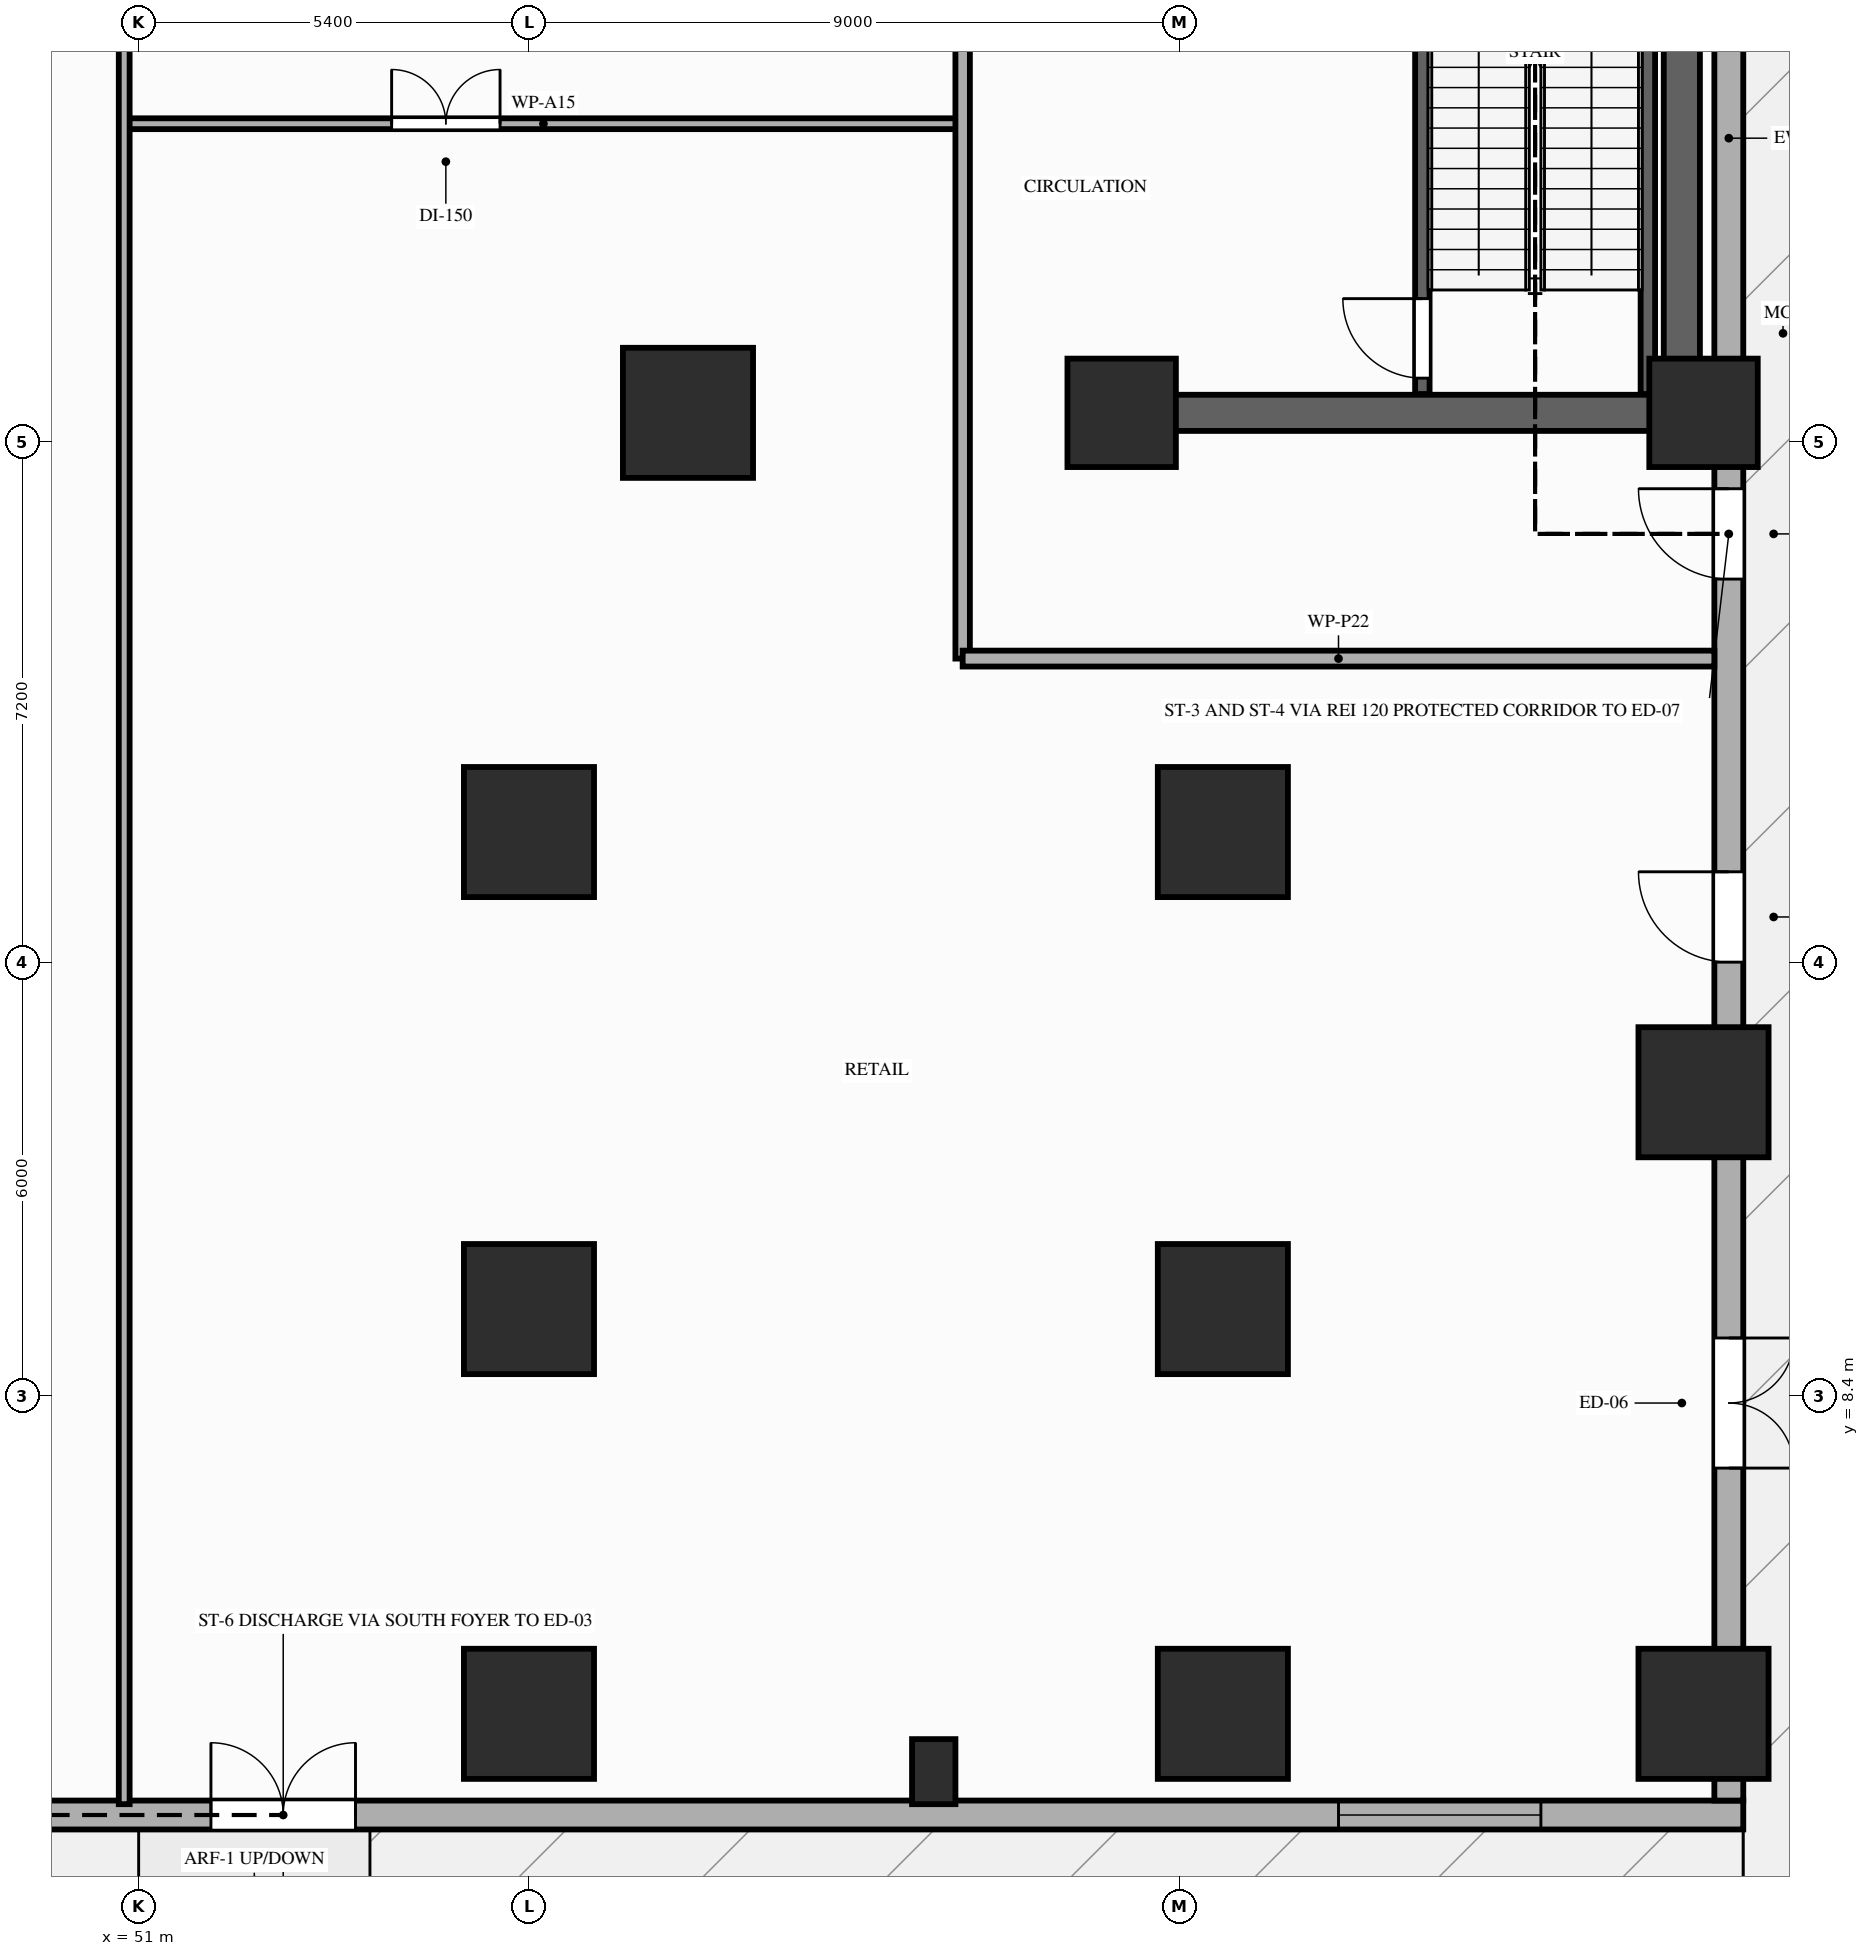
"""IFC4 building model, lengths in metres.
Left out: names, types, materials, properties, quantities, classifications, styles, units other than length and angle.
Written with IfcOpenShell. Run it as: python <this file> out.ifc"""

import sys

from ifc_helpers import new_model, si_unit, direction, frame, frame_2d, origin, origin_2d, place, context, subcontext, project, spatial, rectangle, extrude, element, fill, save


model = new_model("IFC4")
c1 = context("Model", 3, precision=1e-05, world=origin(), true_north=direction((0.0, 1.0)))
c2 = subcontext(c1, "Body", "Model", "MODEL_VIEW")
j1 = project(units=[si_unit("LENGTHUNIT", "METRE"), si_unit("PLANEANGLEUNIT", "RADIAN")], contexts=[c1])
p1 = place(None, origin())
s1 = spatial("IfcSite", under=j1, at=p1, CompositionType="ELEMENT")
p2 = place(p1, origin())
s2 = spatial("IfcBuilding", under=s1, at=p2, CompositionType="ELEMENT")
p3 = place(p2, origin())
s3 = spatial("IfcBuildingStorey", under=s2, at=p3, CompositionType="ELEMENT", Elevation=0.0)
for number, where, z_axis, x_axis in (
    (1, (64.6, 22.0, 0.0), (0.0, 0.0, 1.0), (1.0, 0.0, 0.0)),
    (2, (72.65, 22.0, 0.0), (0.0, 0.0, 1.0), (1.0, 0.0, 0.0)),
):
    element("IfcColumn", number, at=place(p3, frame(where, z_axis=z_axis, x_axis=x_axis)), inside=s3, PredefinedType="COLUMN", context=c2, shape_type="SweptSolid", body=[
        extrude(rectangle(XDim=1.5, YDim=1.5, at=origin_2d()), origin(), (0.0, 0.0, 1.0), 4.6),
    ])
for number, where, z_axis, x_axis in (
    (3, (58.6, 22.0, 0.0), (0.0, 0.0, 1.0), (1.0, 0.0, 0.0)),
    (4, (56.4, 9.6, 0.0), (0.0, 0.0, 1.0), (1.0, 0.0, 0.0)),
    (5, (66.0, 9.6, 0.0), (0.0, 0.0, 1.0), (1.0, 0.0, 0.0)),
    (6, (56.4, 16.2, 0.0), (0.0, 0.0, 1.0), (1.0, 0.0, 0.0)),
    (7, (66.0, 16.2, 0.0), (0.0, 0.0, 1.0), (1.0, 0.0, 0.0)),
    (8, (56.4, 4.0, 0.0), (0.0, 0.0, 1.0), (1.0, 0.0, 0.0)),
    (9, (66.0, 4.0, 0.0), (0.0, 0.0, 1.0), (1.0, 0.0, 0.0)),
    (10, (72.65, 4.0, 0.0), (0.0, 0.0, 1.0), (1.0, 0.0, 0.0)),
    (11, (72.65, 12.6, 0.0), (0.0, 0.0, 1.0), (1.0, 0.0, 0.0)),
):
    element("IfcColumn", number, at=place(p3, frame(where, z_axis=z_axis, x_axis=x_axis)), inside=s3, PredefinedType="COLUMN", context=c2, shape_type="SweptSolid", body=[
        extrude(rectangle(XDim=1.8, YDim=1.8, at=origin_2d()), origin(), (0.0, 0.0, 1.0), 4.6),
    ])
p4 = place(p3, frame((62.0, 3.2, 0.0), z_axis=(0.0, 0.0, 1.0), x_axis=(1.0, 0.0, 0.0)))
e12 = element("IfcColumn", 12, at=p4, inside=s3, PredefinedType="PILASTER", context=c2, shape_type="SweptSolid", body=[
    extrude(rectangle(XDim=0.6, YDim=0.9, at=origin_2d()), origin(), (0.0, 0.0, 1.0), 4.6),
])
p5 = place(p3, frame((3.6, 2.6, 0.0), z_axis=(0.0, 0.0, 1.0), x_axis=(1.0, 0.0, 0.0)))
e13 = element("IfcWall", 13, at=p5, inside=s3, PredefinedType="STANDARD", context=c2, shape_type="SweptSolid", body=[
    extrude(rectangle(XDim=69.6, YDim=0.4, at=frame_2d((34.8, 0.0))), origin(), (0.0, 0.0, 1.0), 4.35),
])
p6 = place(p5, frame((24.6, 0.0, 0.9)))
e14 = element("IfcOpeningElement", 14, at=p6, cuts=e13, PredefinedType="OPENING", context=c2, shape_type="SweptSolid", body=[
    extrude(rectangle(XDim=2.8, YDim=2.2, at=frame_2d((1.4, 1.1))), frame((0.0, 0.21, 0.0), z_axis=(0.0, -1.0, 0.0), x_axis=(1.0, 0.0, 0.0)), (0.0, 0.0, 1.0), 0.42),
])
p7 = place(p5, frame((36.2, 0.0, 0.9)))
e15 = element("IfcOpeningElement", 15, at=p7, cuts=e13, PredefinedType="OPENING", context=c2, shape_type="SweptSolid", body=[
    extrude(rectangle(XDim=2.8, YDim=2.2, at=frame_2d((1.4, 1.1))), frame((0.0, 0.21, 0.0), z_axis=(0.0, -1.0, 0.0), x_axis=(1.0, 0.0, 0.0)), (0.0, 0.0, 1.0), 0.42),
])
p8 = place(p5, frame((64.0, 0.0, 0.9)))
e16 = element("IfcOpeningElement", 16, at=p8, cuts=e13, PredefinedType="OPENING", context=c2, shape_type="SweptSolid", body=[
    extrude(rectangle(XDim=2.8, YDim=2.2, at=frame_2d((1.4, 1.1))), frame((0.0, 0.21, 0.0), z_axis=(0.0, -1.0, 0.0), x_axis=(1.0, 0.0, 0.0)), (0.0, 0.0, 1.0), 0.42),
])
p9 = place(p5, frame((17.2, 0.0, 0.0)))
e17 = element("IfcOpeningElement", 17, at=p9, cuts=e13, PredefinedType="OPENING", context=c2, shape_type="SweptSolid", body=[
    extrude(rectangle(XDim=2.2, YDim=2.45, at=frame_2d((1.1, 1.225))), frame((0.0, 0.21, 0.0), z_axis=(0.0, -1.0, 0.0), x_axis=(1.0, 0.0, 0.0)), (0.0, 0.0, 1.0), 0.42),
])
p10 = place(p5, frame((48.4, 0.0, 0.0)))
e18 = element("IfcOpeningElement", 18, at=p10, cuts=e13, PredefinedType="OPENING", context=c2, shape_type="SweptSolid", body=[
    extrude(rectangle(XDim=2.0, YDim=2.4, at=frame_2d((1.0, 1.2))), frame((0.0, 0.21, 0.0), z_axis=(0.0, -1.0, 0.0), x_axis=(1.0, 0.0, 0.0)), (0.0, 0.0, 1.0), 0.42),
])
p11 = place(p3, frame((73.0, 2.8, 0.0), z_axis=(0.0, 0.0, 1.0), x_axis=(0.0, 1.0, 0.0)))
e19 = element("IfcWall", 19, at=p11, inside=s3, PredefinedType="STANDARD", context=c2, shape_type="SweptSolid", body=[
    extrude(rectangle(XDim=46.0, YDim=0.4, at=frame_2d((23.0, 0.0))), origin(), (0.0, 0.0, 1.0), 3.63),
])
p12 = place(p11, frame((11.6, 0.0, 0.0)))
e20 = element("IfcOpeningElement", 20, at=p12, cuts=e19, PredefinedType="OPENING", context=c2, shape_type="SweptSolid", body=[
    extrude(rectangle(XDim=1.25, YDim=2.2, at=frame_2d((0.625, 1.1))), frame((0.0, 0.21, 0.0), z_axis=(0.0, -1.0, 0.0), x_axis=(1.0, 0.0, 0.0)), (0.0, 0.0, 1.0), 0.42),
])
p13 = place(p11, frame((4.6, 0.0, 0.0)))
e21 = element("IfcOpeningElement", 21, at=p13, cuts=e19, PredefinedType="OPENING", context=c2, shape_type="SweptSolid", body=[
    extrude(rectangle(XDim=1.8, YDim=2.25, at=frame_2d((0.9, 1.125))), frame((0.0, 0.21, 0.0), z_axis=(0.0, -1.0, 0.0), x_axis=(1.0, 0.0, 0.0)), (0.0, 0.0, 1.0), 0.42),
])
p14 = place(p11, frame((16.9, 0.0, 0.0)))
e22 = element("IfcOpeningElement", 22, at=p14, cuts=e19, PredefinedType="OPENING", context=c2, shape_type="SweptSolid", body=[
    extrude(rectangle(XDim=1.25, YDim=2.2, at=frame_2d((0.625, 1.1))), frame((0.0, 0.21, 0.0), z_axis=(0.0, -1.0, 0.0), x_axis=(1.0, 0.0, 0.0)), (0.0, 0.0, 1.0), 0.42),
])
p15 = place(p11, frame((40.95, 0.0, 0.0)))
e23 = element("IfcOpeningElement", 23, at=p15, cuts=e19, PredefinedType="OPENING", context=c2, shape_type="SweptSolid", body=[
    extrude(rectangle(XDim=2.55, YDim=2.55, at=frame_2d((1.275, 1.275))), frame((0.0, 0.21, 0.0), z_axis=(0.0, -1.0, 0.0), x_axis=(1.0, 0.0, 0.0)), (0.0, 0.0, 1.0), 0.42),
])
p16 = place(p3, frame((72.35, 22.0, 0.0), z_axis=(0.0, 0.0, 1.0), x_axis=(0.0, 1.0, 0.0)))
e24 = element("IfcWall", 24, at=p16, inside=s3, PredefinedType="SHEAR", context=c2, shape_type="SweptSolid", body=[
    extrude(rectangle(XDim=20.25, YDim=0.5, at=frame_2d((10.125, 0.0))), origin(), (0.0, 0.0, 1.0), 4.35),
])
p17 = place(p3, frame((64.6, 22.0, 0.0), z_axis=(0.0, 0.0, 1.0), x_axis=(1.0, 0.0, 0.0)))
e25 = element("IfcWall", 25, at=p17, inside=s3, PredefinedType="SHEAR", context=c2, shape_type="SweptSolid", body=[
    extrude(rectangle(XDim=7.5, YDim=0.5, at=frame_2d((3.75, 0.0))), origin(), (0.0, 0.0, 1.0), 4.35),
])
p18 = place(p3, frame((68.76, 22.26, 0.0), z_axis=(0.0, 0.0, 1.0), x_axis=(0.0, 1.0, 0.0)))
e26 = element("IfcWall", 26, at=p18, inside=s3, PredefinedType="SHEAR", context=c2, shape_type="SweptSolid", body=[
    extrude(rectangle(XDim=7.82, YDim=0.2, at=frame_2d((3.91, 0.0))), origin(), (0.0, 0.0, 1.0), 4.35),
])
p19 = place(p18, frame((0.22, 0.0, 0.0)))
e27 = element("IfcOpeningElement", 27, at=p19, cuts=e26, PredefinedType="OPENING", context=c2, shape_type="SweptSolid", body=[
    extrude(rectangle(XDim=1.1, YDim=2.15, at=frame_2d((0.55, 1.075))), frame((0.0, 0.11, 0.0), z_axis=(0.0, -1.0, 0.0), x_axis=(1.0, 0.0, 0.0)), (0.0, 0.0, 1.0), 0.22),
])
p20 = place(p3, frame((71.88, 22.26, 0.0), z_axis=(0.0, 0.0, 1.0), x_axis=(0.0, 1.0, 0.0)))
e28 = element("IfcWall", 28, at=p20, inside=s3, PredefinedType="SHEAR", context=c2, shape_type="SweptSolid", body=[
    extrude(rectangle(XDim=7.82, YDim=0.2, at=frame_2d((3.91, 0.0))), origin(), (0.0, 0.0, 1.0), 4.35),
])
p21 = place(p3, frame((50.8, 26.0, 0.0), z_axis=(0.0, 0.0, 1.0), x_axis=(1.0, 0.0, 0.0)))
e29 = element("IfcWall", 29, at=p21, inside=s3, PredefinedType="PARTITIONING", context=c2, shape_type="SweptSolid", body=[
    extrude(rectangle(XDim=11.6, YDim=0.15, at=frame_2d((5.8, 0.0))), origin(), (0.0, 0.0, 1.0), 3.63),
])
p22 = place(p21, frame((3.7, 0.0, 0.0)))
e30 = element("IfcOpeningElement", 30, at=p22, cuts=e29, PredefinedType="OPENING", context=c2, shape_type="SweptSolid", body=[
    extrude(rectangle(XDim=1.5, YDim=2.18, at=frame_2d((0.75, 1.09))), frame((0.0, 0.085, 0.0), z_axis=(0.0, -1.0, 0.0), x_axis=(1.0, 0.0, 0.0)), (0.0, 0.0, 1.0), 0.17),
])
p23 = place(p3, frame((50.8, 2.75, 0.0), z_axis=(0.0, 0.0, 1.0), x_axis=(0.0, 1.0, 0.0)))
e31 = element("IfcWall", 31, at=p23, inside=s3, PredefinedType="PARTITIONING", context=c2, shape_type="SweptSolid", body=[
    extrude(rectangle(XDim=24.85, YDim=0.15, at=frame_2d((12.425, 0.0))), origin(), (0.0, 0.0, 1.0), 3.43),
])
p24 = place(p3, frame((62.4, 18.6, 0.0), z_axis=(0.0, 0.0, 1.0), x_axis=(0.0, 1.0, 0.0)))
e32 = element("IfcWall", 32, at=p24, inside=s3, PredefinedType="PARTITIONING", context=c2, shape_type="SweptSolid", body=[
    extrude(rectangle(XDim=30.25, YDim=0.2, at=frame_2d((15.125, 0.0))), origin(), (0.0, 0.0, 1.0), 3.63),
])
p25 = place(p24, frame((9.4, 0.0, 0.0)))
e33 = element("IfcOpeningElement", 33, at=p25, cuts=e32, PredefinedType="OPENING", context=c2, shape_type="SweptSolid", body=[
    extrude(rectangle(XDim=1.1, YDim=2.15, at=frame_2d((0.55, 1.075))), frame((0.0, 0.11, 0.0), z_axis=(0.0, -1.0, 0.0), x_axis=(1.0, 0.0, 0.0)), (0.0, 0.0, 1.0), 0.22),
])
p26 = place(p3, frame((62.4, 18.6, 0.0), z_axis=(0.0, 0.0, 1.0), x_axis=(1.0, 0.0, 0.0)))
e34 = element("IfcWall", 34, at=p26, inside=s3, PredefinedType="PARTITIONING", context=c2, shape_type="SweptSolid", body=[
    extrude(rectangle(XDim=10.4, YDim=0.22, at=frame_2d((5.2, 0.0))), origin(), (0.0, 0.0, 1.0), 3.63),
])
p27 = place(p8, origin())
e35 = element("IfcWindow", 35, at=p27, inside=s3, PartitioningType="SINGLE_PANEL", PredefinedType="WINDOW", context=c2, shape_type="SweptSolid", body=[
    extrude(rectangle(XDim=2.8, YDim=2.2, at=frame_2d((1.4, 1.1))), frame((0.0, 0.03, 0.0), z_axis=(0.0, -1.0, 0.0), x_axis=(1.0, 0.0, 0.0)), (0.0, 0.0, 1.0), 0.06),
])
fill(e16, e35)
p28 = place(p10, frame((2.0, 0.0, 0.0), z_axis=(0.0, 0.0, 1.0), x_axis=(-1.0, 0.0, 0.0)))
e36 = element("IfcDoor", 36, at=p28, inside=s3, OperationType="DOUBLE_DOOR_SINGLE_SWING", PredefinedType="DOOR", context=c2, shape_type="SweptSolid", body=[
    extrude(rectangle(XDim=2.0, YDim=2.4, at=frame_2d((1.0, 1.2))), frame((0.0, 0.025, 0.0), z_axis=(0.0, -1.0, 0.0), x_axis=(1.0, 0.0, 0.0)), (0.0, 0.0, 1.0), 0.05),
])
fill(e18, e36)
p29 = place(p12, frame((1.25, 0.0, 0.0), z_axis=(0.0, 0.0, 1.0), x_axis=(-1.0, 0.0, 0.0)))
e37 = element("IfcDoor", 37, at=p29, inside=s3, OperationType="SINGLE_SWING_RIGHT", PredefinedType="DOOR", context=c2, shape_type="SweptSolid", body=[
    extrude(rectangle(XDim=1.25, YDim=2.2, at=frame_2d((0.625, 1.1))), frame((0.0, 0.025, 0.0), z_axis=(0.0, -1.0, 0.0), x_axis=(1.0, 0.0, 0.0)), (0.0, 0.0, 1.0), 0.05),
])
fill(e20, e37)
p30 = place(p13, frame((1.8, 0.0, 0.0), z_axis=(0.0, 0.0, 1.0), x_axis=(-1.0, 0.0, 0.0)))
e38 = element("IfcDoor", 38, at=p30, inside=s3, OperationType="DOUBLE_SWING_RIGHT", PredefinedType="DOOR", context=c2, shape_type="SweptSolid", body=[
    extrude(rectangle(XDim=1.8, YDim=2.25, at=frame_2d((0.9, 1.125))), frame((0.0, 0.025, 0.0), z_axis=(0.0, -1.0, 0.0), x_axis=(1.0, 0.0, 0.0)), (0.0, 0.0, 1.0), 0.05),
])
fill(e21, e38)
p31 = place(p14, frame((1.25, 0.0, 0.0), z_axis=(0.0, 0.0, 1.0), x_axis=(-1.0, 0.0, 0.0)))
e39 = element("IfcDoor", 39, at=p31, inside=s3, OperationType="SINGLE_SWING_RIGHT", PredefinedType="DOOR", context=c2, shape_type="SweptSolid", body=[
    extrude(rectangle(XDim=1.25, YDim=2.2, at=frame_2d((0.625, 1.1))), frame((0.0, 0.025, 0.0), z_axis=(0.0, -1.0, 0.0), x_axis=(1.0, 0.0, 0.0)), (0.0, 0.0, 1.0), 0.05),
])
fill(e22, e39)
p32 = place(p19, origin())
e40 = element("IfcDoor", 40, at=p32, inside=s3, OperationType="SINGLE_SWING_RIGHT", PredefinedType="DOOR", context=c2, shape_type="SweptSolid", body=[
    extrude(rectangle(XDim=1.1, YDim=2.15, at=frame_2d((0.55, 1.075))), frame((0.0, 0.025, 0.0), z_axis=(0.0, -1.0, 0.0), x_axis=(1.0, 0.0, 0.0)), (0.0, 0.0, 1.0), 0.05),
])
fill(e27, e40)
p33 = place(p22, origin())
e41 = element("IfcDoor", 41, at=p33, inside=s3, OperationType="DOUBLE_DOOR_SINGLE_SWING", PredefinedType="DOOR", context=c2, shape_type="SweptSolid", body=[
    extrude(rectangle(XDim=1.5, YDim=2.18, at=frame_2d((0.75, 1.09))), frame((0.0, 0.025, 0.0), z_axis=(0.0, -1.0, 0.0), x_axis=(1.0, 0.0, 0.0)), (0.0, 0.0, 1.0), 0.05),
])
fill(e30, e41)
save(model, sys.argv[1])
